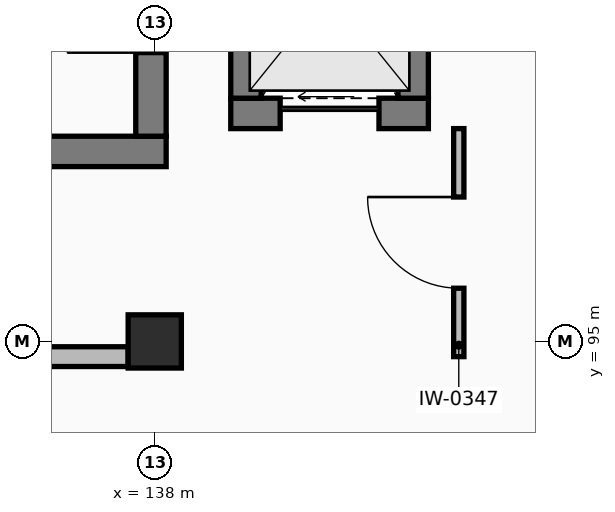
"""IFC4 building model, lengths in metres.
Left out: names, types, materials, properties, quantities, classifications, styles, units other than length and angle.
Written with IfcOpenShell. Run it as: python <this file> out.ifc"""

import sys

from ifc_helpers import new_model, si_unit, direction, frame, frame_2d, origin, origin_2d, place, context, subcontext, project, spatial, rectangle, extrude, element, fill, save


model = new_model("IFC4")
c1 = context("Model", 3, precision=1e-05, world=origin(), true_north=direction((0.0, 1.0)))
c2 = subcontext(c1, "Body", "Model", "MODEL_VIEW")
j1 = project(units=[si_unit("LENGTHUNIT", "METRE"), si_unit("PLANEANGLEUNIT", "RADIAN")], contexts=[c1])
p1 = place(None, origin())
s1 = spatial("IfcSite", under=j1, at=p1, CompositionType="ELEMENT")
p2 = place(p1, origin())
s2 = spatial("IfcBuilding", under=s1, at=p2, CompositionType="ELEMENT")
p3 = place(p2, origin())
s3 = spatial("IfcBuildingStorey", under=s2, at=p3, CompositionType="ELEMENT", Elevation=0.0)
p4 = place(p3, frame((138.0, 95.0, 0.0), z_axis=(0.0, 0.0, 1.0), x_axis=(1.0, 0.0, 0.0)))
e1 = element("IfcColumn", 1, at=p4, inside=s3, PredefinedType="COLUMN", context=c2, shape_type="SweptSolid", body=[
    extrude(rectangle(XDim=0.7, YDim=0.7, at=origin_2d()), origin(), (0.0, 0.0, 1.0), 4.8),
])
p5 = place(p3, frame((129.95, 97.5, 0.0), z_axis=(0.0, 0.0, 1.0), x_axis=(1.0, 0.0, 0.0)))
e2 = element("IfcWall", 2, at=p5, inside=s3, PredefinedType="SHEAR", context=c2, shape_type="SweptSolid", body=[
    extrude(rectangle(XDim=8.2, YDim=0.4, at=frame_2d((4.1, 0.0))), origin(), (0.0, 0.0, 1.0), 4.49),
])
p6 = place(p3, frame((137.95, 97.7, 0.0), z_axis=(0.0, 0.0, 1.0), x_axis=(0.0, 1.0, 0.0)))
e3 = element("IfcWall", 3, at=p6, inside=s3, PredefinedType="SHEAR", context=c2, shape_type="SweptSolid", body=[
    extrude(rectangle(XDim=3.3, YDim=0.4, at=frame_2d((1.65, 0.0))), origin(), (0.0, 0.0, 1.0), 4.49),
])
p7 = place(p6, frame((1.1, 0.0, 0.0)))
e4 = element("IfcOpeningElement", 4, at=p7, cuts=e3, PredefinedType="OPENING", context=c2, shape_type="SweptSolid", body=[
    extrude(rectangle(XDim=1.1, YDim=2.2, at=frame_2d((0.55, 1.1))), frame((0.0, 0.21, 0.0), z_axis=(0.0, -1.0, 0.0), x_axis=(1.0, 0.0, 0.0)), (0.0, 0.0, 1.0), 0.42),
])
p8 = place(p3, frame((139.0, 98.0, 0.0), z_axis=(0.0, 0.0, 1.0), x_axis=(1.0, 0.0, 0.0)))
e5 = element("IfcWall", 5, at=p8, inside=s3, PredefinedType="SHEAR", context=c2, shape_type="SweptSolid", body=[
    extrude(rectangle(XDim=2.6, YDim=0.4, at=frame_2d((1.3, 0.0))), origin(), (0.0, 0.0, 1.0), 4.49),
])
p9 = place(p8, frame((0.65, 0.0, 0.0)))
e6 = element("IfcOpeningElement", 6, at=p9, cuts=e5, PredefinedType="OPENING", context=c2, shape_type="SweptSolid", body=[
    extrude(rectangle(XDim=1.3, YDim=2.25, at=frame_2d((0.65, 1.125))), frame((0.0, 0.21, 0.0), z_axis=(0.0, -1.0, 0.0), x_axis=(1.0, 0.0, 0.0)), (0.0, 0.0, 1.0), 0.42),
])
for number, where, z_axis, x_axis in (
    (7, (141.4, 98.2, 0.0), (0.0, 0.0, 1.0), (0.0, 1.0, 0.0)),
    (8, (139.2, 101.0, 0.0), (0.0, 0.0, 1.0), (0.0, -1.0, 0.0)),
):
    element("IfcWall", number, at=place(p3, frame(where, z_axis=z_axis, x_axis=x_axis)), inside=s3, PredefinedType="SHEAR", context=c2, shape_type="SweptSolid", body=[
        extrude(rectangle(XDim=2.8, YDim=0.4, at=frame_2d((1.4, 0.0))), origin(), (0.0, 0.0, 1.0), 4.49),
    ])
p10 = place(p3, frame((129.2, 94.8, 0.0), z_axis=(0.0, 0.0, 1.0), x_axis=(1.0, 0.0, 0.0)))
e9 = element("IfcWall", 9, at=p10, inside=s3, PredefinedType="PARTITIONING", context=c2, shape_type="SweptSolid", body=[
    extrude(rectangle(XDim=8.45, YDim=0.26, at=frame_2d((4.225, 0.0))), origin(), (0.0, 0.0, 1.0), 3.698),
])
p11 = place(p3, frame((142.0, 94.8, 0.0), z_axis=(0.0, 0.0, 1.0), x_axis=(0.0, 1.0, 0.0)))
e10 = element("IfcWall", 10, at=p11, inside=s3, PredefinedType="PARTITIONING", context=c2, shape_type="SweptSolid", body=[
    extrude(rectangle(XDim=3.0, YDim=0.135, at=frame_2d((1.5, 0.0))), origin(), (0.0, 0.0, 1.0), 3.698),
])
p12 = place(p11, frame((0.9, 0.0, 0.0)))
e11 = element("IfcOpeningElement", 11, at=p12, cuts=e10, PredefinedType="OPENING", context=c2, shape_type="SweptSolid", body=[
    extrude(rectangle(XDim=1.2, YDim=2.2, at=frame_2d((0.6, 1.1))), frame((0.0, 0.077, 0.0), z_axis=(0.0, -1.0, 0.0), x_axis=(1.0, 0.0, 0.0)), (0.0, 0.0, 1.0), 0.155),
])
p13 = place(p9, origin())
e12 = element("IfcDoor", 12, at=p13, inside=s3, OperationType="SLIDING_TO_LEFT", PredefinedType="DOOR", context=c2, shape_type="SweptSolid", body=[
    extrude(rectangle(XDim=1.3, YDim=2.25, at=frame_2d((0.65, 1.125))), frame((0.0, 0.025, 0.0), z_axis=(0.0, -1.0, 0.0), x_axis=(1.0, 0.0, 0.0)), (0.0, 0.0, 1.0), 0.05),
])
fill(e6, e12)
p14 = place(p12, origin())
e13 = element("IfcDoor", 13, at=p14, inside=s3, OperationType="SINGLE_SWING_RIGHT", PredefinedType="DOOR", context=c2, shape_type="SweptSolid", body=[
    extrude(rectangle(XDim=1.2, YDim=2.2, at=frame_2d((0.6, 1.1))), frame((0.0, 0.025, 0.0), z_axis=(0.0, -1.0, 0.0), x_axis=(1.0, 0.0, 0.0)), (0.0, 0.0, 1.0), 0.05),
])
fill(e11, e13)
save(model, sys.argv[1])
